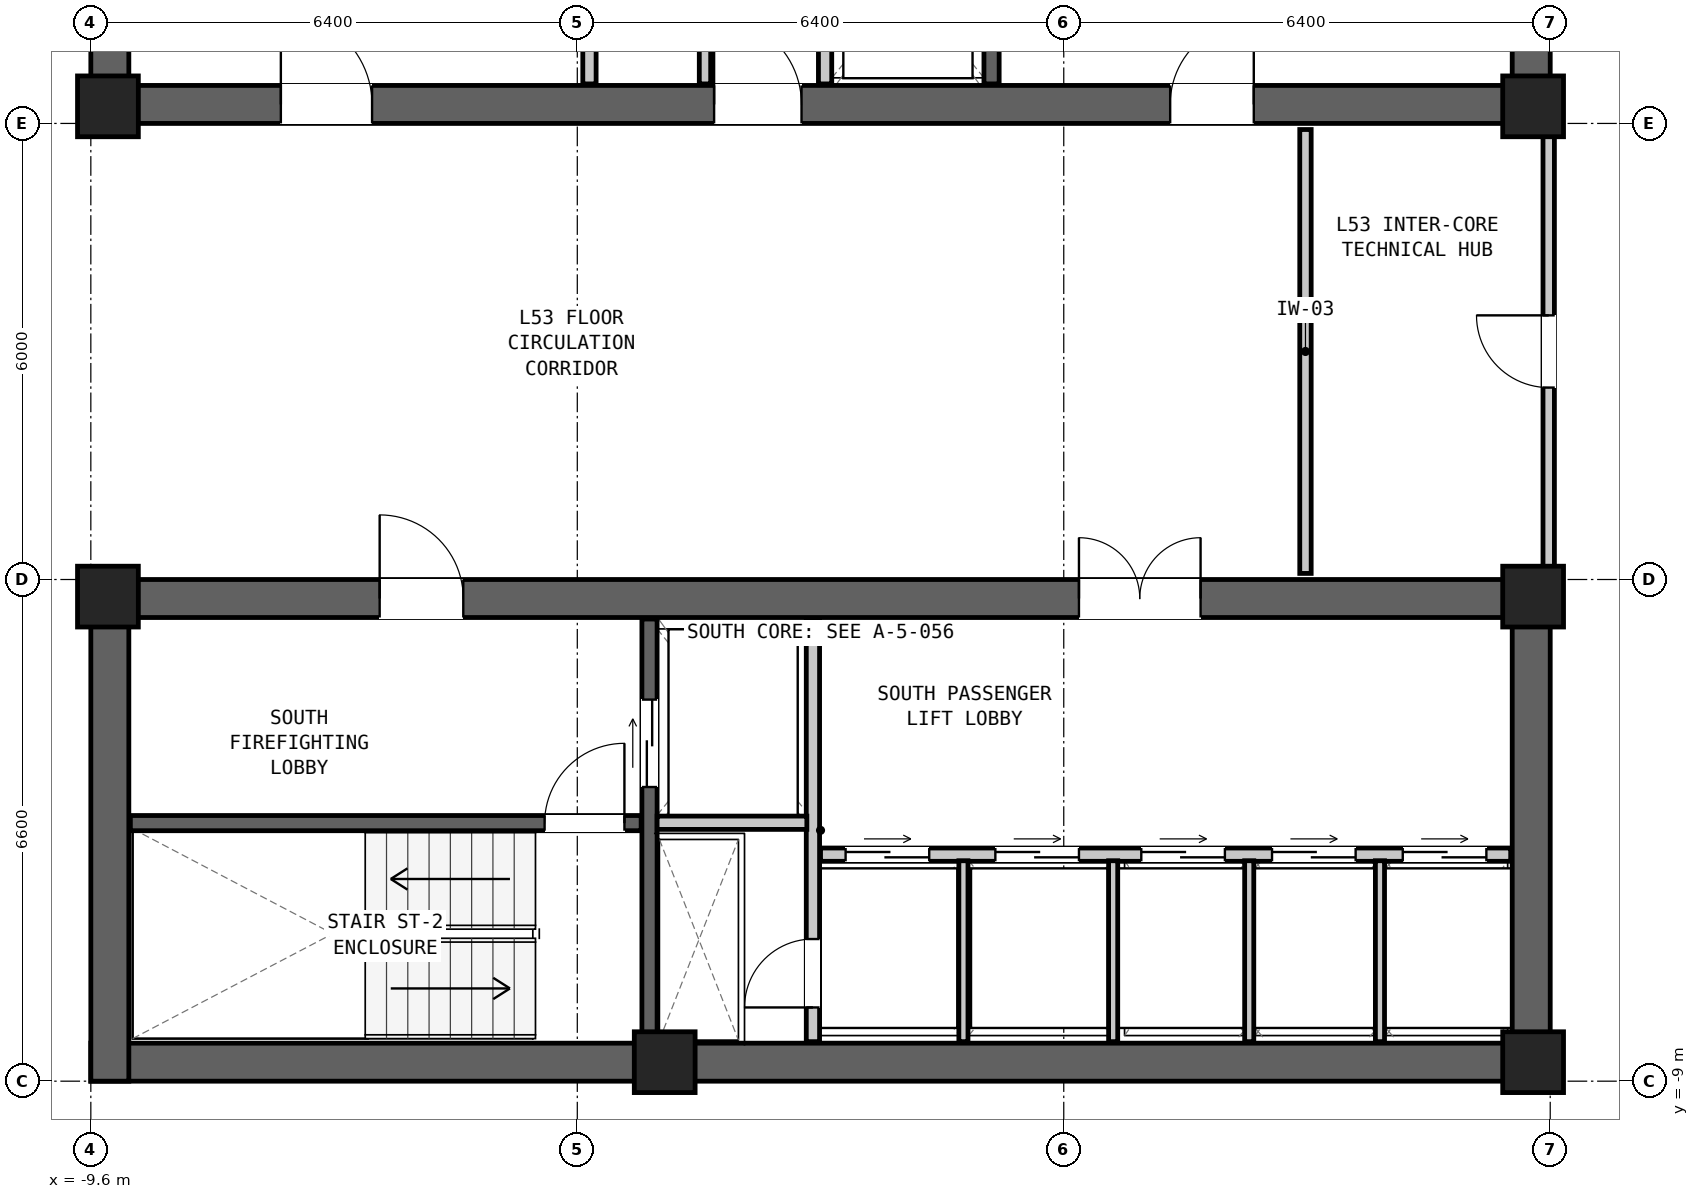
"""IFC4 building model, lengths in metres.
Left out: names, types, materials, properties, quantities, classifications, styles, units other than length and angle.
Written with IfcOpenShell. Run it as: python <this file> out.ifc"""

import sys

from ifc_helpers import new_model, si_unit, direction, frame, frame_2d, origin, origin_2d, place, context, subcontext, project, spatial, rectangle, extrude, element, fill, save


model = new_model("IFC4")
c1 = context("Model", 3, precision=1e-05, world=origin(), true_north=direction((0.0, 1.0)))
c2 = subcontext(c1, "Body", "Model", "MODEL_VIEW")
j1 = project(units=[si_unit("LENGTHUNIT", "METRE"), si_unit("PLANEANGLEUNIT", "RADIAN")], contexts=[c1])
p1 = place(None, origin())
s1 = spatial("IfcSite", under=j1, at=p1, CompositionType="ELEMENT")
p2 = place(p1, origin())
s2 = spatial("IfcBuilding", under=s1, at=p2, CompositionType="ELEMENT")
p3 = place(p2, frame((0.0, 0.0, 180.55)))
s3 = spatial("IfcBuildingStorey", under=s2, at=p3, CompositionType="ELEMENT", Elevation=180.55)
p4 = place(p3, frame((-9.6, 3.85, 0.0), z_axis=(0.0, 0.0, 1.0), x_axis=(1.0, 0.0, 0.0)))
e1 = element("IfcWall", 1, at=p4, inside=s3, PredefinedType="SHEAR", context=c2, shape_type="SweptSolid", body=[
    extrude(rectangle(XDim=19.2, YDim=0.5, at=frame_2d((9.6, 0.0))), origin(), (0.0, 0.0, 1.0), 3.05),
])
p5 = place(p4, frame((14.2, 0.0, 0.0)))
e2 = element("IfcOpeningElement", 2, at=p5, cuts=e1, PredefinedType="OPENING", context=c2, shape_type="SweptSolid", body=[
    extrude(rectangle(XDim=1.1, YDim=2.08, at=frame_2d((0.55, 1.04))), frame((0.0, 0.262, 0.0), z_axis=(0.0, -1.0, 0.0), x_axis=(1.0, 0.0, 0.0)), (0.0, 0.0, 1.0), 0.524),
])
p6 = place(p4, frame((8.2, 0.0, 0.0)))
e3 = element("IfcOpeningElement", 3, at=p6, cuts=e1, PredefinedType="OPENING", context=c2, shape_type="SweptSolid", body=[
    extrude(rectangle(XDim=1.15, YDim=2.1, at=frame_2d((0.575, 1.05))), frame((0.0, 0.262, 0.0), z_axis=(0.0, -1.0, 0.0), x_axis=(1.0, 0.0, 0.0)), (0.0, 0.0, 1.0), 0.524),
])
p7 = place(p4, frame((2.5, 0.0, 0.0)))
e4 = element("IfcOpeningElement", 4, at=p7, cuts=e1, PredefinedType="OPENING", context=c2, shape_type="SweptSolid", body=[
    extrude(rectangle(XDim=1.2, YDim=2.1, at=frame_2d((0.6, 1.05))), frame((0.0, 0.262, 0.0), z_axis=(0.0, -1.0, 0.0), x_axis=(1.0, 0.0, 0.0)), (0.0, 0.0, 1.0), 0.524),
])
for number, where, z_axis, x_axis in (
    (5, (-9.35, 3.6, 0.0), (0.0, 0.0, 1.0), (0.0, 1.0, 0.0)),
    (6, (9.35, 3.6, 0.0), (0.0, 0.0, 1.0), (0.0, 1.0, 0.0)),
):
    element("IfcWall", number, at=place(p3, frame(where, z_axis=z_axis, x_axis=x_axis)), inside=s3, PredefinedType="SHEAR", context=c2, shape_type="SweptSolid", body=[
        extrude(rectangle(XDim=6.6, YDim=0.5, at=frame_2d((3.3, 0.0))), origin(), (0.0, 0.0, 1.0), 3.05),
    ])
p8 = place(p3, frame((-9.6, -8.75, 0.0), z_axis=(0.0, 0.0, 1.0), x_axis=(1.0, 0.0, 0.0)))
e7 = element("IfcWall", 7, at=p8, inside=s3, PredefinedType="SHEAR", context=c2, shape_type="SweptSolid", body=[
    extrude(rectangle(XDim=19.2, YDim=0.5, at=frame_2d((9.6, 0.0))), origin(), (0.0, 0.0, 1.0), 3.05),
])
p9 = place(p3, frame((-9.6, -2.65, 0.0), z_axis=(0.0, 0.0, 1.0), x_axis=(1.0, 0.0, 0.0)))
e8 = element("IfcWall", 8, at=p9, inside=s3, PredefinedType="SHEAR", context=c2, shape_type="SweptSolid", body=[
    extrude(rectangle(XDim=19.2, YDim=0.5, at=frame_2d((9.6, 0.0))), origin(), (0.0, 0.0, 1.0), 3.05),
])
p10 = place(p9, frame((3.8, 0.0, 0.0)))
e9 = element("IfcOpeningElement", 9, at=p10, cuts=e8, PredefinedType="OPENING", context=c2, shape_type="SweptSolid", body=[
    extrude(rectangle(XDim=1.1, YDim=2.08, at=frame_2d((0.55, 1.04))), frame((0.0, 0.262, 0.0), z_axis=(0.0, -1.0, 0.0), x_axis=(1.0, 0.0, 0.0)), (0.0, 0.0, 1.0), 0.524),
])
p11 = place(p9, frame((13.0, 0.0, 0.0)))
e10 = element("IfcOpeningElement", 10, at=p11, cuts=e8, PredefinedType="OPENING", context=c2, shape_type="SweptSolid", body=[
    extrude(rectangle(XDim=1.6, YDim=2.12, at=frame_2d((0.8, 1.06))), frame((0.0, 0.262, 0.0), z_axis=(0.0, -1.0, 0.0), x_axis=(1.0, 0.0, 0.0)), (0.0, 0.0, 1.0), 0.524),
])
for number, where, z_axis, x_axis in (
    (11, (-9.35, -9.0, 0.0), (0.0, 0.0, 1.0), (0.0, 1.0, 0.0)),
    (12, (9.35, -9.0, 0.0), (0.0, 0.0, 1.0), (0.0, 1.0, 0.0)),
):
    element("IfcWall", number, at=place(p3, frame(where, z_axis=z_axis, x_axis=x_axis)), inside=s3, PredefinedType="SHEAR", context=c2, shape_type="SweptSolid", body=[
        extrude(rectangle(XDim=6.6, YDim=0.5, at=frame_2d((3.3, 0.0))), origin(), (0.0, 0.0, 1.0), 3.05),
    ])
for number, where, z_axis, x_axis in (
    (13, (-9.375, 3.825, 0.0), (0.0, 0.0, 1.0), (1.0, 0.0, 0.0)),
    (14, (9.375, 3.825, 0.0), (0.0, 0.0, 1.0), (1.0, 0.0, 0.0)),
    (15, (-9.375, -2.625, 0.0), (0.0, 0.0, 1.0), (1.0, 0.0, 0.0)),
    (16, (9.375, -2.625, 0.0), (0.0, 0.0, 1.0), (1.0, 0.0, 0.0)),
    (17, (-2.05, -8.75, 0.0), (0.0, 0.0, 1.0), (1.0, 0.0, 0.0)),
    (18, (9.375, -8.75, 0.0), (0.0, 0.0, 1.0), (1.0, 0.0, 0.0)),
):
    element("IfcColumn", number, at=place(p3, frame(where, z_axis=z_axis, x_axis=x_axis)), inside=s3, PredefinedType="COLUMN", context=c2, shape_type="SweptSolid", body=[
        extrude(rectangle(XDim=0.8, YDim=0.8, at=origin_2d()), origin(), (0.0, 0.0, 1.0), 3.05),
    ])
p12 = place(p3, frame((2.25, 4.12, 0.0), z_axis=(0.0, 0.0, 1.0), x_axis=(0.0, 1.0, 0.0)))
e19 = element("IfcWall", 19, at=p12, inside=s3, PredefinedType="SHEAR", context=c2, shape_type="SweptSolid", body=[
    extrude(rectangle(XDim=5.56, YDim=0.2, at=frame_2d((2.78, 0.0))), origin(), (0.0, 0.0, 1.0), 2.83),
])
p13 = place(p12, frame((0.65, 0.0, 0.0)))
e20 = element("IfcOpeningElement", 20, at=p13, cuts=e19, PredefinedType="OPENING", context=c2, shape_type="SweptSolid", body=[
    extrude(rectangle(XDim=1.15, YDim=2.08, at=frame_2d((0.575, 1.04))), frame((0.0, 0.112, 0.0), z_axis=(0.0, -1.0, 0.0), x_axis=(1.0, 0.0, 0.0)), (0.0, 0.0, 1.0), 0.224),
])
p14 = place(p3, frame((0.06, 4.12, 0.0), z_axis=(0.0, 0.0, 1.0), x_axis=(0.0, 1.0, 0.0)))
e21 = element("IfcWall", 21, at=p14, inside=s3, PredefinedType="PARTITIONING", context=c2, shape_type="SweptSolid", body=[
    extrude(rectangle(XDim=5.56, YDim=0.175, at=frame_2d((2.78, 0.0))), origin(), (0.0, 0.0, 1.0), 2.83),
])
p15 = place(p14, frame((3.1, 0.0, 0.0)))
e22 = element("IfcOpeningElement", 22, at=p15, cuts=e21, PredefinedType="OPENING", context=c2, shape_type="SweptSolid", body=[
    extrude(rectangle(XDim=1.4, YDim=2.12, at=frame_2d((0.7, 1.06))), frame((0.0, 0.1, 0.0), z_axis=(0.0, -1.0, 0.0), x_axis=(1.0, 0.0, 0.0)), (0.0, 0.0, 1.0), 0.199),
])
p16 = place(p3, frame((-3.04, 4.12, 0.0), z_axis=(0.0, 0.0, 1.0), x_axis=(0.0, 1.0, 0.0)))
e23 = element("IfcWall", 23, at=p16, inside=s3, PredefinedType="PARTITIONING", context=c2, shape_type="SweptSolid", body=[
    extrude(rectangle(XDim=5.56, YDim=0.175, at=frame_2d((2.78, 0.0))), origin(), (0.0, 0.0, 1.0), 2.83),
])
p17 = place(p3, frame((-1.52, 4.12, 0.0), z_axis=(0.0, 0.0, 1.0), x_axis=(0.0, 1.0, 0.0)))
e24 = element("IfcWall", 24, at=p17, inside=s3, PredefinedType="PARTITIONING", context=c2, shape_type="SweptSolid", body=[
    extrude(rectangle(XDim=5.56, YDim=0.15, at=frame_2d((2.78, 0.0))), origin(), (0.0, 0.0, 1.0), 2.83),
])
p18 = place(p17, frame((4.38, 0.0, 0.0)))
e25 = element("IfcOpeningElement", 25, at=p18, cuts=e24, PredefinedType="OPENING", context=c2, shape_type="SweptSolid", body=[
    extrude(rectangle(XDim=0.9, YDim=2.05, at=frame_2d((0.45, 1.025))), frame((0.0, 0.087, 0.0), z_axis=(0.0, -1.0, 0.0), x_axis=(1.0, 0.0, 0.0)), (0.0, 0.0, 1.0), 0.174),
])
p19 = place(p17, frame((0.65, 0.0, 0.0)))
e26 = element("IfcOpeningElement", 26, at=p19, cuts=e24, PredefinedType="OPENING", context=c2, shape_type="SweptSolid", body=[
    extrude(rectangle(XDim=0.9, YDim=2.05, at=frame_2d((0.45, 1.025))), frame((0.0, 0.087, 0.0), z_axis=(0.0, -1.0, 0.0), x_axis=(1.0, 0.0, 0.0)), (0.0, 0.0, 1.0), 0.174),
])
p20 = place(p3, frame((-9.08, -5.605, 0.0), z_axis=(0.0, 0.0, 1.0), x_axis=(1.0, 0.0, 0.0)))
e27 = element("IfcWall", 27, at=p20, inside=s3, PredefinedType="SHEAR", context=c2, shape_type="SweptSolid", body=[
    extrude(rectangle(XDim=6.72, YDim=0.2, at=frame_2d((3.36, 0.0))), origin(), (0.0, 0.0, 1.0), 2.83),
])
p21 = place(p20, frame((5.45, 0.0, 0.0)))
e28 = element("IfcOpeningElement", 28, at=p21, cuts=e27, PredefinedType="OPENING", context=c2, shape_type="SweptSolid", body=[
    extrude(rectangle(XDim=1.05, YDim=2.08, at=frame_2d((0.525, 1.04))), frame((0.0, 0.112, 0.0), z_axis=(0.0, -1.0, 0.0), x_axis=(1.0, 0.0, 0.0)), (0.0, 0.0, 1.0), 0.224),
])
p22 = place(p3, frame((-2.25, -8.48, 0.0), z_axis=(0.0, 0.0, 1.0), x_axis=(0.0, 1.0, 0.0)))
e29 = element("IfcWall", 29, at=p22, inside=s3, PredefinedType="SHEAR", context=c2, shape_type="SweptSolid", body=[
    extrude(rectangle(XDim=5.56, YDim=0.2, at=frame_2d((2.78, 0.0))), origin(), (0.0, 0.0, 1.0), 2.83),
])
p23 = place(p22, frame((3.35, 0.0, 0.0)))
e30 = element("IfcOpeningElement", 30, at=p23, cuts=e29, PredefinedType="OPENING", context=c2, shape_type="SweptSolid", body=[
    extrude(rectangle(XDim=1.15, YDim=2.08, at=frame_2d((0.575, 1.04))), frame((0.0, 0.112, 0.0), z_axis=(0.0, -1.0, 0.0), x_axis=(1.0, 0.0, 0.0)), (0.0, 0.0, 1.0), 0.224),
])
p24 = place(p3, frame((-0.1, -8.48, 0.0), z_axis=(0.0, 0.0, 1.0), x_axis=(0.0, 1.0, 0.0)))
e31 = element("IfcWall", 31, at=p24, inside=s3, PredefinedType="PARTITIONING", context=c2, shape_type="SweptSolid", body=[
    extrude(rectangle(XDim=5.56, YDim=0.175, at=frame_2d((2.78, 0.0))), origin(), (0.0, 0.0, 1.0), 2.83),
])
p25 = place(p24, frame((0.45, 0.0, 0.0)))
e32 = element("IfcOpeningElement", 32, at=p25, cuts=e31, PredefinedType="OPENING", context=c2, shape_type="SweptSolid", body=[
    extrude(rectangle(XDim=0.9, YDim=2.05, at=frame_2d((0.45, 1.025))), frame((0.0, 0.1, 0.0), z_axis=(0.0, -1.0, 0.0), x_axis=(1.0, 0.0, 0.0)), (0.0, 0.0, 1.0), 0.199),
])
p26 = place(p3, frame((-2.15, -5.6, 0.0), z_axis=(0.0, 0.0, 1.0), x_axis=(1.0, 0.0, 0.0)))
e33 = element("IfcWall", 33, at=p26, inside=s3, PredefinedType="PARTITIONING", context=c2, shape_type="SweptSolid", body=[
    extrude(rectangle(XDim=1.97, YDim=0.175, at=frame_2d((0.985, 0.0))), origin(), (0.0, 0.0, 1.0), 2.83),
])
p27 = place(p3, frame((0.0, -6.02, 0.0), z_axis=(0.0, 0.0, 1.0), x_axis=(1.0, 0.0, 0.0)))
e34 = element("IfcWall", 34, at=p27, inside=s3, PredefinedType="PARTITIONING", context=c2, shape_type="SweptSolid", body=[
    extrude(rectangle(XDim=9.08, YDim=0.175, at=frame_2d((4.54, 0.0))), origin(), (0.0, 0.0, 1.0), 2.83),
])
p28 = place(p27, frame((0.33, 0.0, 0.0)))
e35 = element("IfcOpeningElement", 35, at=p28, cuts=e34, PredefinedType="OPENING", context=c2, shape_type="SweptSolid", body=[
    extrude(rectangle(XDim=1.1, YDim=2.06, at=frame_2d((0.55, 1.03))), frame((0.0, 0.1, 0.0), z_axis=(0.0, -1.0, 0.0), x_axis=(1.0, 0.0, 0.0)), (0.0, 0.0, 1.0), 0.199),
])
p29 = place(p27, frame((2.3, 0.0, 0.0)))
e36 = element("IfcOpeningElement", 36, at=p29, cuts=e34, PredefinedType="OPENING", context=c2, shape_type="SweptSolid", body=[
    extrude(rectangle(XDim=1.1, YDim=2.06, at=frame_2d((0.55, 1.03))), frame((0.0, 0.1, 0.0), z_axis=(0.0, -1.0, 0.0), x_axis=(1.0, 0.0, 0.0)), (0.0, 0.0, 1.0), 0.199),
])
p30 = place(p27, frame((4.22, 0.0, 0.0)))
e37 = element("IfcOpeningElement", 37, at=p30, cuts=e34, PredefinedType="OPENING", context=c2, shape_type="SweptSolid", body=[
    extrude(rectangle(XDim=1.1, YDim=2.06, at=frame_2d((0.55, 1.03))), frame((0.0, 0.1, 0.0), z_axis=(0.0, -1.0, 0.0), x_axis=(1.0, 0.0, 0.0)), (0.0, 0.0, 1.0), 0.199),
])
p31 = place(p27, frame((5.94, 0.0, 0.0)))
e38 = element("IfcOpeningElement", 38, at=p31, cuts=e34, PredefinedType="OPENING", context=c2, shape_type="SweptSolid", body=[
    extrude(rectangle(XDim=1.1, YDim=2.06, at=frame_2d((0.55, 1.03))), frame((0.0, 0.1, 0.0), z_axis=(0.0, -1.0, 0.0), x_axis=(1.0, 0.0, 0.0)), (0.0, 0.0, 1.0), 0.199),
])
p32 = place(p27, frame((7.66, 0.0, 0.0)))
e39 = element("IfcOpeningElement", 39, at=p32, cuts=e34, PredefinedType="OPENING", context=c2, shape_type="SweptSolid", body=[
    extrude(rectangle(XDim=1.1, YDim=2.06, at=frame_2d((0.55, 1.03))), frame((0.0, 0.1, 0.0), z_axis=(0.0, -1.0, 0.0), x_axis=(1.0, 0.0, 0.0)), (0.0, 0.0, 1.0), 0.199),
])
for number, where, z_axis, x_axis in (
    (40, (1.88, -8.48, 0.0), (0.0, 0.0, 1.0), (0.0, 1.0, 0.0)),
    (41, (3.85, -8.48, 0.0), (0.0, 0.0, 1.0), (0.0, 1.0, 0.0)),
    (42, (5.64, -8.48, 0.0), (0.0, 0.0, 1.0), (0.0, 1.0, 0.0)),
    (43, (7.36, -8.48, 0.0), (0.0, 0.0, 1.0), (0.0, 1.0, 0.0)),
):
    element("IfcWall", number, at=place(p3, frame(where, z_axis=z_axis, x_axis=x_axis)), inside=s3, PredefinedType="PARTITIONING", context=c2, shape_type="SweptSolid", body=[
        extrude(rectangle(XDim=2.38, YDim=0.12, at=frame_2d((1.19, 0.0))), origin(), (0.0, 0.0, 1.0), 2.83),
    ])
p33 = place(p3, frame((6.38, -2.32, 0.0), z_axis=(0.0, 0.0, 1.0), x_axis=(0.0, 1.0, 0.0)))
e44 = element("IfcWall", 44, at=p33, inside=s3, PredefinedType="PARTITIONING", context=c2, shape_type="SweptSolid", body=[
    extrude(rectangle(XDim=5.84, YDim=0.15, at=frame_2d((2.92, 0.0))), origin(), (0.0, 0.0, 1.0), 2.198),
])
p34 = place(p3, frame((9.58, -2.32, 0.0), z_axis=(0.0, 0.0, 1.0), x_axis=(0.0, 1.0, 0.0)))
e45 = element("IfcWall", 45, at=p34, inside=s3, PredefinedType="PARTITIONING", context=c2, shape_type="SweptSolid", body=[
    extrude(rectangle(XDim=5.84, YDim=0.15, at=frame_2d((2.92, 0.0))), origin(), (0.0, 0.0, 1.0), 2.198),
])
p35 = place(p34, frame((2.445, 0.0, 0.0)))
e46 = element("IfcOpeningElement", 46, at=p35, cuts=e45, PredefinedType="OPENING", context=c2, shape_type="SweptSolid", body=[
    extrude(rectangle(XDim=0.95, YDim=2.1, at=frame_2d((0.475, 1.05))), frame((0.0, 0.087, 0.0), z_axis=(0.0, -1.0, 0.0), x_axis=(1.0, 0.0, 0.0)), (0.0, 0.0, 1.0), 0.174),
])
p36 = place(p5, origin())
e47 = element("IfcDoor", 47, at=p36, inside=s3, OperationType="SINGLE_SWING_RIGHT", PredefinedType="DOOR", context=c2, shape_type="SweptSolid", body=[
    extrude(rectangle(XDim=1.1, YDim=2.08, at=frame_2d((0.55, 1.04))), frame((0.0, 0.025, 0.0), z_axis=(0.0, -1.0, 0.0), x_axis=(1.0, 0.0, 0.0)), (0.0, 0.0, 1.0), 0.05),
])
fill(e2, e47)
p37 = place(p6, origin())
e48 = element("IfcDoor", 48, at=p37, inside=s3, OperationType="SINGLE_SWING_LEFT", PredefinedType="DOOR", context=c2, shape_type="SweptSolid", body=[
    extrude(rectangle(XDim=1.15, YDim=2.1, at=frame_2d((0.575, 1.05))), frame((0.0, 0.025, 0.0), z_axis=(0.0, -1.0, 0.0), x_axis=(1.0, 0.0, 0.0)), (0.0, 0.0, 1.0), 0.05),
])
fill(e3, e48)
p38 = place(p7, origin())
e49 = element("IfcDoor", 49, at=p38, inside=s3, OperationType="SINGLE_SWING_LEFT", PredefinedType="DOOR", context=c2, shape_type="SweptSolid", body=[
    extrude(rectangle(XDim=1.2, YDim=2.1, at=frame_2d((0.6, 1.05))), frame((0.0, 0.025, 0.0), z_axis=(0.0, -1.0, 0.0), x_axis=(1.0, 0.0, 0.0)), (0.0, 0.0, 1.0), 0.05),
])
fill(e4, e49)
p39 = place(p21, origin())
e50 = element("IfcDoor", 50, at=p39, inside=s3, OperationType="SINGLE_SWING_RIGHT", PredefinedType="DOOR", context=c2, shape_type="SweptSolid", body=[
    extrude(rectangle(XDim=1.05, YDim=2.08, at=frame_2d((0.525, 1.04))), frame((0.0, 0.025, 0.0), z_axis=(0.0, -1.0, 0.0), x_axis=(1.0, 0.0, 0.0)), (0.0, 0.0, 1.0), 0.05),
])
fill(e28, e50)
p40 = place(p10, origin())
e51 = element("IfcDoor", 51, at=p40, inside=s3, OperationType="SINGLE_SWING_LEFT", PredefinedType="DOOR", context=c2, shape_type="SweptSolid", body=[
    extrude(rectangle(XDim=1.1, YDim=2.08, at=frame_2d((0.55, 1.04))), frame((0.0, 0.025, 0.0), z_axis=(0.0, -1.0, 0.0), x_axis=(1.0, 0.0, 0.0)), (0.0, 0.0, 1.0), 0.05),
])
fill(e9, e51)
p41 = place(p23, origin())
e52 = element("IfcDoor", 52, at=p41, inside=s3, OperationType="DOUBLE_DOOR_SLIDING", PredefinedType="DOOR", context=c2, shape_type="SweptSolid", body=[
    extrude(rectangle(XDim=1.15, YDim=2.08, at=frame_2d((0.575, 1.04))), frame((0.0, 0.025, 0.0), z_axis=(0.0, -1.0, 0.0), x_axis=(1.0, 0.0, 0.0)), (0.0, 0.0, 1.0), 0.05),
])
fill(e30, e52)
p42 = place(p25, origin())
e53 = element("IfcDoor", 53, at=p42, inside=s3, OperationType="SINGLE_SWING_LEFT", PredefinedType="DOOR", context=c2, shape_type="SweptSolid", body=[
    extrude(rectangle(XDim=0.9, YDim=2.05, at=frame_2d((0.45, 1.025))), frame((0.0, 0.025, 0.0), z_axis=(0.0, -1.0, 0.0), x_axis=(1.0, 0.0, 0.0)), (0.0, 0.0, 1.0), 0.05),
])
fill(e32, e53)
p43 = place(p28, origin())
e54 = element("IfcDoor", 54, at=p43, inside=s3, OperationType="DOUBLE_DOOR_SLIDING", PredefinedType="DOOR", context=c2, shape_type="SweptSolid", body=[
    extrude(rectangle(XDim=1.1, YDim=2.06, at=frame_2d((0.55, 1.03))), frame((0.0, 0.025, 0.0), z_axis=(0.0, -1.0, 0.0), x_axis=(1.0, 0.0, 0.0)), (0.0, 0.0, 1.0), 0.05),
])
fill(e35, e54)
p44 = place(p29, origin())
e55 = element("IfcDoor", 55, at=p44, inside=s3, OperationType="DOUBLE_DOOR_SLIDING", PredefinedType="DOOR", context=c2, shape_type="SweptSolid", body=[
    extrude(rectangle(XDim=1.1, YDim=2.06, at=frame_2d((0.55, 1.03))), frame((0.0, 0.025, 0.0), z_axis=(0.0, -1.0, 0.0), x_axis=(1.0, 0.0, 0.0)), (0.0, 0.0, 1.0), 0.05),
])
fill(e36, e55)
p45 = place(p11, origin())
e56 = element("IfcDoor", 56, at=p45, inside=s3, OperationType="DOUBLE_DOOR_SINGLE_SWING", PredefinedType="DOOR", context=c2, shape_type="SweptSolid", body=[
    extrude(rectangle(XDim=1.6, YDim=2.12, at=frame_2d((0.8, 1.06))), frame((0.0, 0.025, 0.0), z_axis=(0.0, -1.0, 0.0), x_axis=(1.0, 0.0, 0.0)), (0.0, 0.0, 1.0), 0.05),
])
fill(e10, e56)
p46 = place(p35, origin())
e57 = element("IfcDoor", 57, at=p46, inside=s3, OperationType="SINGLE_SWING_RIGHT", PredefinedType="DOOR", context=c2, shape_type="SweptSolid", body=[
    extrude(rectangle(XDim=0.95, YDim=2.1, at=frame_2d((0.475, 1.05))), frame((0.0, 0.025, 0.0), z_axis=(0.0, -1.0, 0.0), x_axis=(1.0, 0.0, 0.0)), (0.0, 0.0, 1.0), 0.05),
])
fill(e46, e57)
p47 = place(p30, origin())
e58 = element("IfcDoor", 58, at=p47, inside=s3, OperationType="DOUBLE_DOOR_SLIDING", PredefinedType="DOOR", context=c2, shape_type="SweptSolid", body=[
    extrude(rectangle(XDim=1.1, YDim=2.06, at=frame_2d((0.55, 1.03))), frame((0.0, 0.025, 0.0), z_axis=(0.0, -1.0, 0.0), x_axis=(1.0, 0.0, 0.0)), (0.0, 0.0, 1.0), 0.05),
])
fill(e37, e58)
p48 = place(p31, origin())
e59 = element("IfcDoor", 59, at=p48, inside=s3, OperationType="DOUBLE_DOOR_SLIDING", PredefinedType="DOOR", context=c2, shape_type="SweptSolid", body=[
    extrude(rectangle(XDim=1.1, YDim=2.06, at=frame_2d((0.55, 1.03))), frame((0.0, 0.025, 0.0), z_axis=(0.0, -1.0, 0.0), x_axis=(1.0, 0.0, 0.0)), (0.0, 0.0, 1.0), 0.05),
])
fill(e38, e59)
p49 = place(p32, origin())
e60 = element("IfcDoor", 60, at=p49, inside=s3, OperationType="DOUBLE_DOOR_SLIDING", PredefinedType="DOOR", context=c2, shape_type="SweptSolid", body=[
    extrude(rectangle(XDim=1.1, YDim=2.06, at=frame_2d((0.55, 1.03))), frame((0.0, 0.025, 0.0), z_axis=(0.0, -1.0, 0.0), x_axis=(1.0, 0.0, 0.0)), (0.0, 0.0, 1.0), 0.05),
])
fill(e39, e60)
save(model, sys.argv[1])
